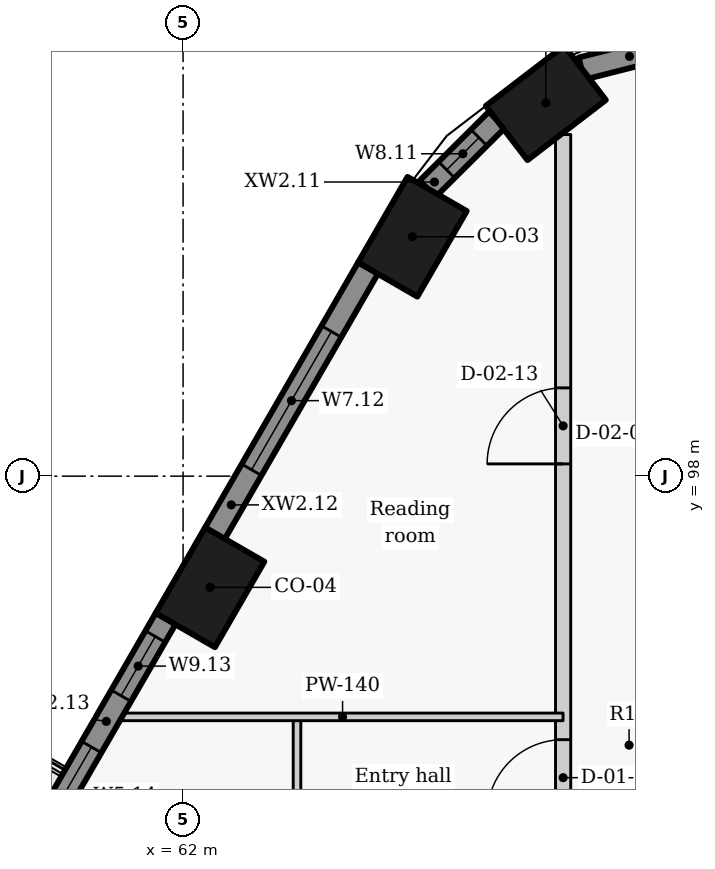
"""IFC4 building model, lengths in metres.
Left out: names, types, materials, properties, quantities, classifications, styles, units other than length and angle.
Written with IfcOpenShell. Run it as: python <this file> out.ifc"""

import sys

from ifc_helpers import new_model, si_unit, direction, frame, frame_2d, origin, origin_2d, place, context, subcontext, project, spatial, rectangle, extrude, element, fill, save


model = new_model("IFC4")
c1 = context("Model", 3, precision=1e-05, world=origin(), true_north=direction((0.0, 1.0)))
c2 = subcontext(c1, "Body", "Model", "MODEL_VIEW")
j1 = project(units=[si_unit("LENGTHUNIT", "METRE"), si_unit("PLANEANGLEUNIT", "RADIAN")], contexts=[c1])
p1 = place(None, origin())
s1 = spatial("IfcSite", under=j1, at=p1, CompositionType="ELEMENT")
p2 = place(p1, origin())
s2 = spatial("IfcBuilding", under=s1, at=p2, CompositionType="ELEMENT")
p3 = place(p2, frame((0.0, 0.0, 127.2)))
s3 = spatial("IfcBuildingStorey", under=s2, at=p3, CompositionType="ELEMENT", Elevation=127.2)
for number, where, z_axis, x_axis in (
    (1, (66.773, 102.91, 0.0), (0.0, 0.0, 1.0), (-0.793, -0.609, 0.0)),
    (2, (65.018, 101.149, 0.0), (0.0, 0.0, 1.0), (-0.5, -0.866, 0.0)),
    (3, (62.354, 96.537, 0.0), (0.0, 0.0, 1.0), (-0.5, -0.866, 0.0)),
):
    element("IfcColumn", number, at=place(p3, frame(where, z_axis=z_axis, x_axis=x_axis)), inside=s3, PredefinedType="COLUMN", context=c2, shape_type="SweptSolid", body=[
        extrude(rectangle(XDim=1.3, YDim=0.9, at=origin_2d()), origin(), (0.0, 0.0, 1.0), 3.3),
    ])
p4 = place(p3, frame((68.506, 103.683, 0.0), z_axis=(0.0, 0.0, 1.0), x_axis=(-0.96924493129, -0.246098076322, 0.0)))
e4 = element("IfcWall", 4, at=p4, inside=s3, PredefinedType="SOLIDWALL", context=c2, shape_type="SweptSolid", body=[
    extrude(rectangle(XDim=1.305, YDim=0.3, at=frame_2d((0.653, 0.0))), origin(), (0.0, 0.0, 1.0), 2.425),
])
p5 = place(p3, frame((66.129, 102.688, 0.0), z_axis=(0.0, 0.0, 1.0), x_axis=(-0.70881270082, -0.705396735997, 0.0)))
e5 = element("IfcWall", 5, at=p5, inside=s3, PredefinedType="SOLIDWALL", context=c2, shape_type="SweptSolid", body=[
    extrude(rectangle(XDim=1.286, YDim=0.3, at=frame_2d((0.643, 0.0))), origin(), (0.0, 0.0, 1.0), 2.425),
])
p6 = place(p5, frame((0.333, 0.0, 0.9)))
e6 = element("IfcOpeningElement", 6, at=p6, cuts=e5, PredefinedType="OPENING", context=c2, shape_type="SweptSolid", body=[
    extrude(rectangle(XDim=0.6, YDim=1.1, at=frame_2d((0.3, 0.55))), frame((0.0, 0.16, 0.0), z_axis=(0.0, -1.0, 0.0), x_axis=(1.0, 0.0, 0.0)), (0.0, 0.0, 1.0), 0.32),
])
p7 = place(p3, frame((64.435, 100.74, 0.0), z_axis=(0.0, 0.0, 1.0), x_axis=(-0.500031546601, -0.86600718958, 0.0)))
e7 = element("IfcWall", 7, at=p7, inside=s3, PredefinedType="SOLIDWALL", context=c2, shape_type="SweptSolid", body=[
    extrude(rectangle(XDim=4.034, YDim=0.3, at=frame_2d((2.017, 0.0))), origin(), (0.0, 0.0, 1.0), 2.425),
])
p8 = place(p7, frame((0.967, 0.0, 0.9)))
e8 = element("IfcOpeningElement", 8, at=p8, cuts=e7, PredefinedType="OPENING", context=c2, shape_type="SweptSolid", body=[
    extrude(rectangle(XDim=2.1, YDim=1.1, at=frame_2d((1.05, 0.55))), frame((0.0, 0.16, 0.0), z_axis=(0.0, -1.0, 0.0), x_axis=(1.0, 0.0, 0.0)), (0.0, 0.0, 1.0), 0.32),
])
p9 = place(p3, frame((61.772, 96.128, 0.0), z_axis=(0.0, 0.0, 1.0), x_axis=(-0.500031546601, -0.86600718958, 0.0)))
e9 = element("IfcWall", 9, at=p9, inside=s3, PredefinedType="SOLIDWALL", context=c2, shape_type="SweptSolid", body=[
    extrude(rectangle(XDim=4.034, YDim=0.3, at=frame_2d((2.017, 0.0))), origin(), (0.0, 0.0, 1.0), 2.425),
])
p10 = place(p9, frame((0.274, 0.0, 0.9)))
e10 = element("IfcOpeningElement", 10, at=p10, cuts=e9, PredefinedType="OPENING", context=c2, shape_type="SweptSolid", body=[
    extrude(rectangle(XDim=0.9, YDim=1.1, at=frame_2d((0.45, 0.55))), frame((0.0, 0.16, 0.0), z_axis=(0.0, -1.0, 0.0), x_axis=(1.0, 0.0, 0.0)), (0.0, 0.0, 1.0), 0.32),
])
p11 = place(p9, frame((1.953, 0.0, 0.9)))
e11 = element("IfcOpeningElement", 11, at=p11, cuts=e9, PredefinedType="OPENING", context=c2, shape_type="SweptSolid", body=[
    extrude(rectangle(XDim=1.5, YDim=1.1, at=frame_2d((0.75, 0.55))), frame((0.0, 0.16, 0.0), z_axis=(0.0, -1.0, 0.0), x_axis=(1.0, 0.0, 0.0)), (0.0, 0.0, 1.0), 0.32),
])
p12 = place(p3, frame((67.0, 56.833, 0.0), z_axis=(0.0, 0.0, 1.0), x_axis=(0.0, 1.0, 0.0)))
e12 = element("IfcWall", 12, at=p12, inside=s3, PredefinedType="PARTITIONING", context=c2, shape_type="SweptSolid", body=[
    extrude(rectangle(XDim=45.661, YDim=0.2, at=frame_2d((22.831, 0.0))), origin(), (0.0, 0.0, 1.0), 2.405),
])
p13 = place(p12, frame((9.534, 0.0, 0.0)))
e13 = element("IfcOpeningElement", 13, at=p13, cuts=e12, PredefinedType="OPENING", context=c2, shape_type="SweptSolid", body=[
    extrude(rectangle(XDim=1.0, YDim=2.1, at=frame_2d((0.5, 1.05))), frame((0.0, 0.11, 0.0), z_axis=(0.0, -1.0, 0.0), x_axis=(1.0, 0.0, 0.0)), (0.0, 0.0, 1.0), 0.22),
])
p14 = place(p12, frame((24.367, 0.0, 0.0)))
e14 = element("IfcOpeningElement", 14, at=p14, cuts=e12, PredefinedType="OPENING", context=c2, shape_type="SweptSolid", body=[
    extrude(rectangle(XDim=1.0, YDim=2.1, at=frame_2d((0.5, 1.05))), frame((0.0, 0.11, 0.0), z_axis=(0.0, -1.0, 0.0), x_axis=(1.0, 0.0, 0.0)), (0.0, 0.0, 1.0), 0.22),
])
p15 = place(p12, frame((36.7, 0.0, 0.0)))
e15 = element("IfcOpeningElement", 15, at=p15, cuts=e12, PredefinedType="OPENING", context=c2, shape_type="SweptSolid", body=[
    extrude(rectangle(XDim=1.0, YDim=2.1, at=frame_2d((0.5, 1.05))), frame((0.0, 0.11, 0.0), z_axis=(0.0, -1.0, 0.0), x_axis=(1.0, 0.0, 0.0)), (0.0, 0.0, 1.0), 0.22),
])
p16 = place(p12, frame((41.328, 0.0, 0.0)))
e16 = element("IfcOpeningElement", 16, at=p16, cuts=e12, PredefinedType="OPENING", context=c2, shape_type="SweptSolid", body=[
    extrude(rectangle(XDim=1.0, YDim=2.1, at=frame_2d((0.5, 1.05))), frame((0.0, 0.11, 0.0), z_axis=(0.0, -1.0, 0.0), x_axis=(1.0, 0.0, 0.0)), (0.0, 0.0, 1.0), 0.22),
])
p17 = place(p3, frame((63.499, 86.5, 0.0), z_axis=(0.0, 0.0, 1.0), x_axis=(0.0, 1.0, 0.0)))
e17 = element("IfcWall", 17, at=p17, inside=s3, PredefinedType="PARTITIONING", context=c2, shape_type="SweptSolid", body=[
    extrude(rectangle(XDim=8.333, YDim=0.1, at=frame_2d((4.167, 0.0))), origin(), (0.0, 0.0, 1.0), 3.025),
])
p18 = place(p17, frame((3.717, 0.0, 0.0)))
e18 = element("IfcOpeningElement", 18, at=p18, cuts=e17, PredefinedType="OPENING", context=c2, shape_type="SweptSolid", body=[
    extrude(rectangle(XDim=0.9, YDim=2.1, at=frame_2d((0.45, 1.05))), frame((0.0, 0.06, 0.0), z_axis=(0.0, -1.0, 0.0), x_axis=(1.0, 0.0, 0.0)), (0.0, 0.0, 1.0), 0.12),
])
p19 = place(p3, frame((61.198, 94.833, 0.0), z_axis=(0.0, 0.0, 1.0), x_axis=(1.0, 0.0, 0.0)))
e19 = element("IfcWall", 19, at=p19, inside=s3, PredefinedType="PARTITIONING", context=c2, shape_type="SweptSolid", body=[
    extrude(rectangle(XDim=5.802, YDim=0.1, at=frame_2d((2.901, 0.0))), origin(), (0.0, 0.0, 1.0), 2.405),
])
p20 = place(p6, origin())
e20 = element("IfcWindow", 20, at=p20, inside=s3, PartitioningType="SINGLE_PANEL", PredefinedType="WINDOW", context=c2, shape_type="SweptSolid", body=[
    extrude(rectangle(XDim=0.6, YDim=1.1, at=frame_2d((0.3, 0.55))), frame((0.0, 0.03, 0.0), z_axis=(0.0, -1.0, 0.0), x_axis=(1.0, 0.0, 0.0)), (0.0, 0.0, 1.0), 0.06),
])
fill(e6, e20)
p21 = place(p8, origin())
e21 = element("IfcWindow", 21, at=p21, inside=s3, PartitioningType="SINGLE_PANEL", PredefinedType="WINDOW", context=c2, shape_type="SweptSolid", body=[
    extrude(rectangle(XDim=2.1, YDim=1.1, at=frame_2d((1.05, 0.55))), frame((0.0, 0.03, 0.0), z_axis=(0.0, -1.0, 0.0), x_axis=(1.0, 0.0, 0.0)), (0.0, 0.0, 1.0), 0.06),
])
fill(e8, e21)
p22 = place(p10, origin())
e22 = element("IfcWindow", 22, at=p22, inside=s3, PartitioningType="SINGLE_PANEL", PredefinedType="WINDOW", context=c2, shape_type="SweptSolid", body=[
    extrude(rectangle(XDim=0.9, YDim=1.1, at=frame_2d((0.45, 0.55))), frame((0.0, 0.03, 0.0), z_axis=(0.0, -1.0, 0.0), x_axis=(1.0, 0.0, 0.0)), (0.0, 0.0, 1.0), 0.06),
])
fill(e10, e22)
p23 = place(p11, origin())
e23 = element("IfcWindow", 23, at=p23, inside=s3, PartitioningType="SINGLE_PANEL", PredefinedType="WINDOW", context=c2, shape_type="SweptSolid", body=[
    extrude(rectangle(XDim=1.5, YDim=1.1, at=frame_2d((0.75, 0.55))), frame((0.0, 0.03, 0.0), z_axis=(0.0, -1.0, 0.0), x_axis=(1.0, 0.0, 0.0)), (0.0, 0.0, 1.0), 0.06),
])
fill(e11, e23)
p24 = place(p15, origin())
e24 = element("IfcDoor", 24, at=p24, inside=s3, OperationType="SINGLE_SWING_LEFT", PredefinedType="DOOR", context=c2, shape_type="SweptSolid", body=[
    extrude(rectangle(XDim=1.0, YDim=2.1, at=frame_2d((0.5, 1.05))), frame((0.0, 0.025, 0.0), z_axis=(0.0, -1.0, 0.0), x_axis=(1.0, 0.0, 0.0)), (0.0, 0.0, 1.0), 0.05),
])
fill(e15, e24)
p25 = place(p16, origin())
e25 = element("IfcDoor", 25, at=p25, inside=s3, OperationType="SINGLE_SWING_LEFT", PredefinedType="DOOR", context=c2, shape_type="SweptSolid", body=[
    extrude(rectangle(XDim=1.0, YDim=2.1, at=frame_2d((0.5, 1.05))), frame((0.0, 0.025, 0.0), z_axis=(0.0, -1.0, 0.0), x_axis=(1.0, 0.0, 0.0)), (0.0, 0.0, 1.0), 0.05),
])
fill(e16, e25)
save(model, sys.argv[1])
